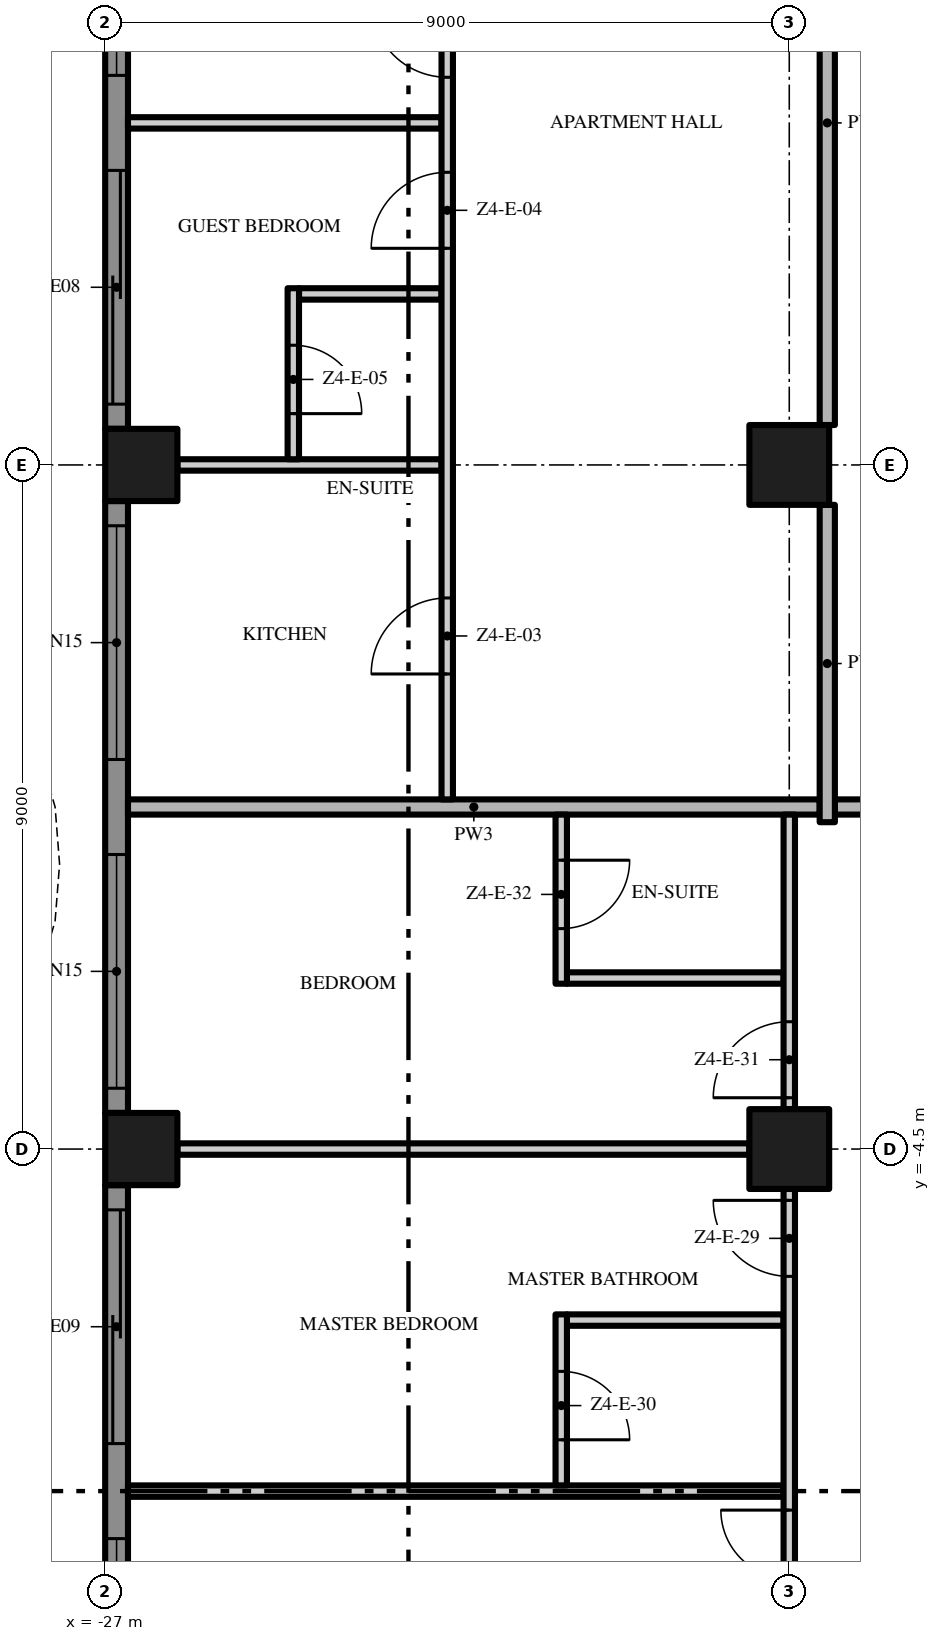
"""IFC4 building model, lengths in metres.
Left out: names, types, materials, properties, quantities, classifications, styles, units other than length and angle.
Written with IfcOpenShell. Run it as: python <this file> out.ifc"""

import sys

from ifc_helpers import new_model, si_unit, direction, frame, frame_2d, origin, origin_2d, place, context, subcontext, project, spatial, polyline, rectangle, outline, extrude, element, fill, save


model = new_model("IFC4")
c1 = context("Model", 3, precision=1e-05, world=origin(), true_north=direction((0.0, 1.0)))
c2 = subcontext(c1, "Body", "Model", "MODEL_VIEW")
j1 = project(units=[si_unit("LENGTHUNIT", "METRE"), si_unit("PLANEANGLEUNIT", "RADIAN")], contexts=[c1])
p1 = place(None, origin())
s1 = spatial("IfcSite", under=j1, at=p1, CompositionType="ELEMENT")
p2 = place(p1, origin())
s2 = spatial("IfcBuilding", under=s1, at=p2, CompositionType="ELEMENT")
p3 = place(p2, frame((0.0, 0.0, 226.2)))
s3 = spatial("IfcBuildingStorey", under=s2, at=p3, CompositionType="ELEMENT", Elevation=226.2)
for number, where, z_axis, x_axis in (
    (1, (-18.0, -4.5, 0.0), (0.0, 0.0, 1.0), (1.0, 0.0, 0.0)),
    (2, (-18.0, 4.5, 0.0), (0.0, 0.0, 1.0), (1.0, 0.0, 0.0)),
):
    element("IfcColumn", number, at=place(p3, frame(where, z_axis=z_axis, x_axis=x_axis)), inside=s3, PredefinedType="COLUMN", context=c2, shape_type="SweptSolid", body=[
        extrude(rectangle(XDim=1.05, YDim=1.05, at=origin_2d()), origin(), (0.0, 0.0, 1.0), 3.5),
    ])
for number, where, z_axis, x_axis in (
    (3, (-26.525, -4.5, 0.0), (0.0, 0.0, 1.0), (1.0, 0.0, 0.0)),
    (4, (-26.525, 4.5, 0.0), (0.0, 0.0, 1.0), (1.0, 0.0, 0.0)),
):
    element("IfcColumn", number, at=place(p3, frame(where, z_axis=z_axis, x_axis=x_axis)), inside=s3, PredefinedType="COLUMN", context=c2, shape_type="SweptSolid", body=[
        extrude(rectangle(XDim=0.95, YDim=0.95, at=origin_2d()), origin(), (0.0, 0.0, 1.0), 3.5),
    ])
p4 = place(p3, frame((-26.85, 4.975, 0.0), z_axis=(0.0, 0.0, 1.0), x_axis=(0.0, 1.0, 0.0)))
e5 = element("IfcWall", 5, at=p4, inside=s3, PredefinedType="SOLIDWALL", context=c2, shape_type="SweptSolid", body=[
    extrude(rectangle(XDim=8.05, YDim=0.3, at=frame_2d((4.025, 0.0))), origin(), (0.0, 0.0, 1.0), 3.5),
])
p5 = place(p4, frame((4.65, 0.0, 0.45)))
e6 = element("IfcOpeningElement", 6, at=p5, cuts=e5, PredefinedType="OPENING", context=c2, shape_type="SweptSolid", body=[
    extrude(rectangle(XDim=3.075, YDim=2.65, at=frame_2d((1.538, 1.325))), frame((0.0, 0.16, 0.0), z_axis=(0.0, -1.0, 0.0), x_axis=(1.0, 0.0, 0.0)), (0.0, 0.0, 1.0), 0.32),
])
p6 = place(p4, frame((0.325, 0.0, 0.0)))
e7 = element("IfcOpeningElement", 7, at=p6, cuts=e5, PredefinedType="OPENING", context=c2, shape_type="SweptSolid", body=[
    extrude(rectangle(XDim=3.075, YDim=2.4, at=frame_2d((1.538, 1.2))), frame((0.0, 0.16, 0.0), z_axis=(0.0, -1.0, 0.0), x_axis=(1.0, 0.0, 0.0)), (0.0, 0.0, 1.0), 0.32),
])
p7 = place(p3, frame((-26.85, -4.025, 0.0), z_axis=(0.0, 0.0, 1.0), x_axis=(0.0, 1.0, 0.0)))
e8 = element("IfcWall", 8, at=p7, inside=s3, PredefinedType="SOLIDWALL", context=c2, shape_type="SweptSolid", body=[
    extrude(rectangle(XDim=8.05, YDim=0.3, at=frame_2d((4.025, 0.0))), origin(), (0.0, 0.0, 1.0), 3.5),
])
p8 = place(p7, frame((4.65, 0.0, 0.45)))
e9 = element("IfcOpeningElement", 9, at=p8, cuts=e8, PredefinedType="OPENING", context=c2, shape_type="SweptSolid", body=[
    extrude(rectangle(XDim=3.075, YDim=2.65, at=frame_2d((1.538, 1.325))), frame((0.0, 0.16, 0.0), z_axis=(0.0, -1.0, 0.0), x_axis=(1.0, 0.0, 0.0)), (0.0, 0.0, 1.0), 0.32),
])
p9 = place(p7, frame((0.325, 0.0, 0.45)))
e10 = element("IfcOpeningElement", 10, at=p9, cuts=e8, PredefinedType="OPENING", context=c2, shape_type="SweptSolid", body=[
    extrude(rectangle(XDim=3.075, YDim=2.65, at=frame_2d((1.538, 1.325))), frame((0.0, 0.16, 0.0), z_axis=(0.0, -1.0, 0.0), x_axis=(1.0, 0.0, 0.0)), (0.0, 0.0, 1.0), 0.32),
])
p10 = place(p3, frame((-26.85, -13.025, 0.0), z_axis=(0.0, 0.0, 1.0), x_axis=(0.0, 1.0, 0.0)))
e11 = element("IfcWall", 11, at=p10, inside=s3, PredefinedType="SOLIDWALL", context=c2, shape_type="SweptSolid", body=[
    extrude(rectangle(XDim=8.05, YDim=0.3, at=frame_2d((4.025, 0.0))), origin(), (0.0, 0.0, 1.0), 3.5),
])
p11 = place(p10, frame((4.65, 0.0, 0.0)))
e12 = element("IfcOpeningElement", 12, at=p11, cuts=e11, PredefinedType="OPENING", context=c2, shape_type="SweptSolid", body=[
    extrude(rectangle(XDim=3.075, YDim=2.4, at=frame_2d((1.538, 1.2))), frame((0.0, 0.16, 0.0), z_axis=(0.0, -1.0, 0.0), x_axis=(1.0, 0.0, 0.0)), (0.0, 0.0, 1.0), 0.32),
])
p12 = place(p10, frame((0.325, 0.0, 0.45)))
e13 = element("IfcOpeningElement", 13, at=p12, cuts=e11, PredefinedType="OPENING", context=c2, shape_type="SweptSolid", body=[
    extrude(rectangle(XDim=3.075, YDim=2.65, at=frame_2d((1.538, 1.325))), frame((0.0, 0.16, 0.0), z_axis=(0.0, -1.0, 0.0), x_axis=(1.0, 0.0, 0.0)), (0.0, 0.0, 1.0), 0.32),
])
p13 = place(p3, origin())
e14 = element("IfcWall", 14, at=p13, inside=s3, PredefinedType="USERDEFINED", context=c2, shape_type="SweptSolid", body=[
    extrude(outline(polyline([(-28.8, 18.0), (-28.095, 16.5), (-27.659, 15.0), (-27.6, 14.25), (-27.659, 13.5), (-28.095, 12.0), (-28.8, 10.5), (-29.505, 9.0), (-29.941, 7.5), (-30.0, 6.75), (-29.941, 6.0), (-29.505, 4.5), (-28.8, 3.0), (-28.095, 1.5), (-27.659, 0.0), (-27.6, -0.75), (-27.659, -1.5), (-28.095, -3.0), (-28.8, -4.5), (-29.505, -6.0), (-29.941, -7.5), (-30.0, -8.25), (-29.941, -9.0), (-29.505, -10.5), (-28.8, -12.0), (-28.095, -13.5), (-27.659, -15.0), (-27.6, -15.75), (-27.659, -16.5), (-28.095, -18.0), (-27.855, -18.07), (-27.411, -16.545), (-27.349, -15.75), (-27.411, -14.955), (-27.86, -13.411), (-28.574, -11.894), (-29.271, -10.411), (-29.694, -8.955), (-29.749, -8.25), (-29.694, -7.545), (-29.271, -6.089), (-28.574, -4.606), (-27.86, -3.089), (-27.411, -1.545), (-27.349, -0.75), (-27.411, 0.045), (-27.86, 1.589), (-28.574, 3.106), (-29.271, 4.589), (-29.694, 6.045), (-29.749, 6.75), (-29.694, 7.455), (-29.271, 8.911), (-28.574, 10.394), (-27.86, 11.911), (-27.411, 13.455), (-27.349, 14.25), (-27.411, 15.045), (-27.86, 16.589), (-28.574, 18.106), (-28.8, 18.0)])), origin(), (0.0, 0.0, 1.0), 0.9),
])
p14 = place(p3, frame((-26.7, -9.0, 0.0), z_axis=(0.0, 0.0, 1.0), x_axis=(1.0, 0.0, 0.0)))
e15 = element("IfcWall", 15, at=p14, inside=s3, PredefinedType="PARTITIONING", context=c2, shape_type="SweptSolid", body=[
    extrude(rectangle(XDim=8.625, YDim=0.15, at=frame_2d((4.312, 0.0))), origin(), (0.0, 0.0, 1.0), 3.5),
])
p15 = place(p3, frame((-20.925, -6.75, 0.0), z_axis=(0.0, 0.0, 1.0), x_axis=(1.0, 0.0, 0.0)))
e16 = element("IfcWall", 16, at=p15, inside=s3, PredefinedType="PARTITIONING", context=c2, shape_type="SweptSolid", body=[
    extrude(rectangle(XDim=2.85, YDim=0.15, at=frame_2d((1.425, 0.0))), origin(), (0.0, 0.0, 1.0), 3.5),
])
p16 = place(p3, frame((-26.05, -4.5, 0.0), z_axis=(0.0, 0.0, 1.0), x_axis=(1.0, 0.0, 0.0)))
e17 = element("IfcWall", 17, at=p16, inside=s3, PredefinedType="PARTITIONING", context=c2, shape_type="SweptSolid", body=[
    extrude(rectangle(XDim=7.525, YDim=0.15, at=frame_2d((3.763, 0.0))), origin(), (0.0, 0.0, 1.0), 3.5),
])
p17 = place(p3, frame((-20.925, -2.25, 0.0), z_axis=(0.0, 0.0, 1.0), x_axis=(1.0, 0.0, 0.0)))
e18 = element("IfcWall", 18, at=p17, inside=s3, PredefinedType="PARTITIONING", context=c2, shape_type="SweptSolid", body=[
    extrude(rectangle(XDim=2.85, YDim=0.15, at=frame_2d((1.425, 0.0))), origin(), (0.0, 0.0, 1.0), 3.5),
])
p18 = place(p3, frame((-17.4, 0.0, 0.0), z_axis=(0.0, 0.0, 1.0), x_axis=(1.0, 0.0, 0.0)))
e19 = element("IfcWall", 19, at=p18, inside=s3, PredefinedType="PARTITIONING", context=c2, shape_type="SweptSolid", body=[
    extrude(rectangle(XDim=12.8, YDim=0.2, at=frame_2d((6.4, 0.0))), origin(), (0.0, 0.0, 1.0), 3.5),
])
p19 = place(p3, frame((-26.7, 0.0, 0.0), z_axis=(0.0, 0.0, 1.0), x_axis=(1.0, 0.0, 0.0)))
e20 = element("IfcWall", 20, at=p19, inside=s3, PredefinedType="PARTITIONING", context=c2, shape_type="SweptSolid", body=[
    extrude(rectangle(XDim=9.1, YDim=0.2, at=frame_2d((4.55, 0.0))), origin(), (0.0, 0.0, 1.0), 3.5),
])
p20 = place(p3, frame((-26.05, 4.5, 0.0), z_axis=(0.0, 0.0, 1.0), x_axis=(1.0, 0.0, 0.0)))
e21 = element("IfcWall", 21, at=p20, inside=s3, PredefinedType="PARTITIONING", context=c2, shape_type="SweptSolid", body=[
    extrude(rectangle(XDim=3.475, YDim=0.15, at=frame_2d((1.738, 0.0))), origin(), (0.0, 0.0, 1.0), 3.5),
])
p21 = place(p3, frame((-24.45, 6.75, 0.0), z_axis=(0.0, 0.0, 1.0), x_axis=(1.0, 0.0, 0.0)))
e22 = element("IfcWall", 22, at=p21, inside=s3, PredefinedType="PARTITIONING", context=c2, shape_type="SweptSolid", body=[
    extrude(rectangle(XDim=1.875, YDim=0.15, at=frame_2d((0.938, 0.0))), origin(), (0.0, 0.0, 1.0), 3.5),
])
p22 = place(p3, frame((-26.7, 9.0, 0.0), z_axis=(0.0, 0.0, 1.0), x_axis=(1.0, 0.0, 0.0)))
e23 = element("IfcWall", 23, at=p22, inside=s3, PredefinedType="PARTITIONING", context=c2, shape_type="SweptSolid", body=[
    extrude(rectangle(XDim=4.125, YDim=0.15, at=frame_2d((2.062, 0.0))), origin(), (0.0, 0.0, 1.0), 3.5),
])
p23 = place(p3, frame((-24.525, 6.825, 0.0), z_axis=(0.0, 0.0, 1.0), x_axis=(0.0, -1.0, 0.0)))
e24 = element("IfcWall", 24, at=p23, inside=s3, PredefinedType="PARTITIONING", context=c2, shape_type="SweptSolid", body=[
    extrude(rectangle(XDim=2.25, YDim=0.15, at=frame_2d((1.125, 0.0))), origin(), (0.0, 0.0, 1.0), 3.5),
])
p24 = place(p23, frame((0.75, 0.0, 0.0)))
e25 = element("IfcOpeningElement", 25, at=p24, cuts=e24, PredefinedType="OPENING", context=c2, shape_type="SweptSolid", body=[
    extrude(rectangle(XDim=0.9, YDim=2.1, at=frame_2d((0.45, 1.05))), frame((0.0, 0.085, 0.0), z_axis=(0.0, -1.0, 0.0), x_axis=(1.0, 0.0, 0.0)), (0.0, 0.0, 1.0), 0.17),
])
p25 = place(p3, frame((-22.5, 0.1, 0.0), z_axis=(0.0, 0.0, 1.0), x_axis=(0.0, 1.0, 0.0)))
e26 = element("IfcWall", 26, at=p25, inside=s3, PredefinedType="PARTITIONING", context=c2, shape_type="SweptSolid", body=[
    extrude(rectangle(XDim=17.425, YDim=0.15, at=frame_2d((8.713, 0.0))), origin(), (0.0, 0.0, 1.0), 3.5),
])
p26 = place(p25, frame((1.65, 0.0, 0.0)))
e27 = element("IfcOpeningElement", 27, at=p26, cuts=e26, PredefinedType="OPENING", context=c2, shape_type="SweptSolid", body=[
    extrude(rectangle(XDim=1.0, YDim=2.4, at=frame_2d((0.5, 1.2))), frame((0.0, 0.085, 0.0), z_axis=(0.0, -1.0, 0.0), x_axis=(1.0, 0.0, 0.0)), (0.0, 0.0, 1.0), 0.17),
])
p27 = place(p25, frame((7.25, 0.0, 0.0)))
e28 = element("IfcOpeningElement", 28, at=p27, cuts=e26, PredefinedType="OPENING", context=c2, shape_type="SweptSolid", body=[
    extrude(rectangle(XDim=1.0, YDim=2.4, at=frame_2d((0.5, 1.2))), frame((0.0, 0.085, 0.0), z_axis=(0.0, -1.0, 0.0), x_axis=(1.0, 0.0, 0.0)), (0.0, 0.0, 1.0), 0.17),
])
p28 = place(p25, frame((9.5, 0.0, 0.0)))
e29 = element("IfcOpeningElement", 29, at=p28, cuts=e26, PredefinedType="OPENING", context=c2, shape_type="SweptSolid", body=[
    extrude(rectangle(XDim=1.0, YDim=2.4, at=frame_2d((0.5, 1.2))), frame((0.0, 0.085, 0.0), z_axis=(0.0, -1.0, 0.0), x_axis=(1.0, 0.0, 0.0)), (0.0, 0.0, 1.0), 0.17),
])
p29 = place(p25, frame((16.275, 0.0, 0.0)))
e30 = element("IfcOpeningElement", 30, at=p29, cuts=e26, PredefinedType="OPENING", context=c2, shape_type="SweptSolid", body=[
    extrude(rectangle(XDim=1.0, YDim=2.4, at=frame_2d((0.5, 1.2))), frame((0.0, 0.085, 0.0), z_axis=(0.0, -1.0, 0.0), x_axis=(1.0, 0.0, 0.0)), (0.0, 0.0, 1.0), 0.17),
])
p30 = place(p3, frame((-21.0, -6.675, 0.0), z_axis=(0.0, 0.0, 1.0), x_axis=(0.0, -1.0, 0.0)))
e31 = element("IfcWall", 31, at=p30, inside=s3, PredefinedType="PARTITIONING", context=c2, shape_type="SweptSolid", body=[
    extrude(rectangle(XDim=2.25, YDim=0.15, at=frame_2d((1.125, 0.0))), origin(), (0.0, 0.0, 1.0), 3.5),
])
p31 = place(p30, frame((0.75, 0.0, 0.0)))
e32 = element("IfcOpeningElement", 32, at=p31, cuts=e31, PredefinedType="OPENING", context=c2, shape_type="SweptSolid", body=[
    extrude(rectangle(XDim=0.9, YDim=2.1, at=frame_2d((0.45, 1.05))), frame((0.0, 0.085, 0.0), z_axis=(0.0, -1.0, 0.0), x_axis=(1.0, 0.0, 0.0)), (0.0, 0.0, 1.0), 0.17),
])
p32 = place(p3, frame((-21.0, -0.1, 0.0), z_axis=(0.0, 0.0, 1.0), x_axis=(0.0, -1.0, 0.0)))
e33 = element("IfcWall", 33, at=p32, inside=s3, PredefinedType="PARTITIONING", context=c2, shape_type="SweptSolid", body=[
    extrude(rectangle(XDim=2.225, YDim=0.15, at=frame_2d((1.113, 0.0))), origin(), (0.0, 0.0, 1.0), 3.5),
])
p33 = place(p32, frame((0.6, 0.0, 0.0)))
e34 = element("IfcOpeningElement", 34, at=p33, cuts=e33, PredefinedType="OPENING", context=c2, shape_type="SweptSolid", body=[
    extrude(rectangle(XDim=0.9, YDim=2.1, at=frame_2d((0.45, 1.05))), frame((0.0, 0.085, 0.0), z_axis=(0.0, -1.0, 0.0), x_axis=(1.0, 0.0, 0.0)), (0.0, 0.0, 1.0), 0.17),
])
p34 = place(p3, frame((-18.0, -12.975, 0.0), z_axis=(0.0, 0.0, 1.0), x_axis=(0.0, 1.0, 0.0)))
e35 = element("IfcWall", 35, at=p34, inside=s3, PredefinedType="PARTITIONING", context=c2, shape_type="SweptSolid", body=[
    extrude(rectangle(XDim=7.95, YDim=0.15, at=frame_2d((3.975, 0.0))), origin(), (0.0, 0.0, 1.0), 3.5),
])
p35 = place(p34, frame((1.925, 0.0, 0.0)))
e36 = element("IfcOpeningElement", 36, at=p35, cuts=e35, PredefinedType="OPENING", context=c2, shape_type="SweptSolid", body=[
    extrude(rectangle(XDim=1.8, YDim=2.4, at=frame_2d((0.9, 1.2))), frame((0.0, 0.085, 0.0), z_axis=(0.0, -1.0, 0.0), x_axis=(1.0, 0.0, 0.0)), (0.0, 0.0, 1.0), 0.17),
])
p36 = place(p34, frame((6.8, 0.0, 0.0)))
e37 = element("IfcOpeningElement", 37, at=p36, cuts=e35, PredefinedType="OPENING", context=c2, shape_type="SweptSolid", body=[
    extrude(rectangle(XDim=1.0, YDim=2.4, at=frame_2d((0.5, 1.2))), frame((0.0, 0.085, 0.0), z_axis=(0.0, -1.0, 0.0), x_axis=(1.0, 0.0, 0.0)), (0.0, 0.0, 1.0), 0.17),
])
p37 = place(p3, frame((-18.0, -3.975, 0.0), z_axis=(0.0, 0.0, 1.0), x_axis=(0.0, 1.0, 0.0)))
e38 = element("IfcWall", 38, at=p37, inside=s3, PredefinedType="PARTITIONING", context=c2, shape_type="SweptSolid", body=[
    extrude(rectangle(XDim=3.875, YDim=0.15, at=frame_2d((1.938, 0.0))), origin(), (0.0, 0.0, 1.0), 3.5),
])
p38 = place(p37, frame((0.15, 0.0, 0.0)))
e39 = element("IfcOpeningElement", 39, at=p38, cuts=e38, PredefinedType="OPENING", context=c2, shape_type="SweptSolid", body=[
    extrude(rectangle(XDim=1.0, YDim=2.4, at=frame_2d((0.5, 1.2))), frame((0.0, 0.085, 0.0), z_axis=(0.0, -1.0, 0.0), x_axis=(1.0, 0.0, 0.0)), (0.0, 0.0, 1.0), 0.17),
])
p39 = place(p3, frame((-17.5, -0.2, 0.0), z_axis=(0.0, 0.0, 1.0), x_axis=(0.0, 1.0, 0.0)))
e40 = element("IfcWall", 40, at=p39, inside=s3, PredefinedType="PARTITIONING", context=c2, shape_type="SweptSolid", body=[
    extrude(rectangle(XDim=4.175, YDim=0.2, at=frame_2d((2.087, 0.0))), origin(), (0.0, 0.0, 1.0), 3.5),
])
p40 = place(p3, frame((-17.5, 5.025, 0.0), z_axis=(0.0, 0.0, 1.0), x_axis=(0.0, 1.0, 0.0)))
e41 = element("IfcWall", 41, at=p40, inside=s3, PredefinedType="PARTITIONING", context=c2, shape_type="SweptSolid", body=[
    extrude(rectangle(XDim=7.95, YDim=0.2, at=frame_2d((3.975, 0.0))), origin(), (0.0, 0.0, 1.0), 3.5),
])
p41 = place(p5, origin())
e42 = element("IfcWindow", 42, at=p41, inside=s3, PartitioningType="SINGLE_PANEL", PredefinedType="WINDOW", context=c2, shape_type="SweptSolid", body=[
    extrude(rectangle(XDim=3.075, YDim=2.65, at=frame_2d((1.538, 1.325))), frame((0.0, 0.03, 0.0), z_axis=(0.0, -1.0, 0.0), x_axis=(1.0, 0.0, 0.0)), (0.0, 0.0, 1.0), 0.06),
])
fill(e6, e42)
p42 = place(p6, origin())
e43 = element("IfcDoor", 43, at=p42, inside=s3, OperationType="SINGLE_SWING_LEFT", PredefinedType="DOOR", context=c2, shape_type="SweptSolid", body=[
    extrude(rectangle(XDim=3.075, YDim=2.4, at=frame_2d((1.538, 1.2))), frame((0.0, 0.025, 0.0), z_axis=(0.0, -1.0, 0.0), x_axis=(1.0, 0.0, 0.0)), (0.0, 0.0, 1.0), 0.05),
])
fill(e7, e43)
p43 = place(p8, origin())
e44 = element("IfcWindow", 44, at=p43, inside=s3, PartitioningType="SINGLE_PANEL", PredefinedType="WINDOW", context=c2, shape_type="SweptSolid", body=[
    extrude(rectangle(XDim=3.075, YDim=2.65, at=frame_2d((1.538, 1.325))), frame((0.0, 0.03, 0.0), z_axis=(0.0, -1.0, 0.0), x_axis=(1.0, 0.0, 0.0)), (0.0, 0.0, 1.0), 0.06),
])
fill(e9, e44)
p44 = place(p9, origin())
e45 = element("IfcWindow", 45, at=p44, inside=s3, PartitioningType="SINGLE_PANEL", PredefinedType="WINDOW", context=c2, shape_type="SweptSolid", body=[
    extrude(rectangle(XDim=3.075, YDim=2.65, at=frame_2d((1.538, 1.325))), frame((0.0, 0.03, 0.0), z_axis=(0.0, -1.0, 0.0), x_axis=(1.0, 0.0, 0.0)), (0.0, 0.0, 1.0), 0.06),
])
fill(e10, e45)
p45 = place(p11, origin())
e46 = element("IfcDoor", 46, at=p45, inside=s3, OperationType="SINGLE_SWING_LEFT", PredefinedType="DOOR", context=c2, shape_type="SweptSolid", body=[
    extrude(rectangle(XDim=3.075, YDim=2.4, at=frame_2d((1.538, 1.2))), frame((0.0, 0.025, 0.0), z_axis=(0.0, -1.0, 0.0), x_axis=(1.0, 0.0, 0.0)), (0.0, 0.0, 1.0), 0.05),
])
fill(e12, e46)
p46 = place(p12, origin())
e47 = element("IfcWindow", 47, at=p46, inside=s3, PartitioningType="SINGLE_PANEL", PredefinedType="WINDOW", context=c2, shape_type="SweptSolid", body=[
    extrude(rectangle(XDim=3.075, YDim=2.65, at=frame_2d((1.538, 1.325))), frame((0.0, 0.03, 0.0), z_axis=(0.0, -1.0, 0.0), x_axis=(1.0, 0.0, 0.0)), (0.0, 0.0, 1.0), 0.06),
])
fill(e13, e47)
p47 = place(p26, origin())
e48 = element("IfcDoor", 48, at=p47, inside=s3, OperationType="SINGLE_SWING_LEFT", PredefinedType="DOOR", context=c2, shape_type="SweptSolid", body=[
    extrude(rectangle(XDim=1.0, YDim=2.4, at=frame_2d((0.5, 1.2))), frame((0.0, 0.025, 0.0), z_axis=(0.0, -1.0, 0.0), x_axis=(1.0, 0.0, 0.0)), (0.0, 0.0, 1.0), 0.05),
])
fill(e27, e48)
p48 = place(p27, origin())
e49 = element("IfcDoor", 49, at=p48, inside=s3, OperationType="SINGLE_SWING_LEFT", PredefinedType="DOOR", context=c2, shape_type="SweptSolid", body=[
    extrude(rectangle(XDim=1.0, YDim=2.4, at=frame_2d((0.5, 1.2))), frame((0.0, 0.025, 0.0), z_axis=(0.0, -1.0, 0.0), x_axis=(1.0, 0.0, 0.0)), (0.0, 0.0, 1.0), 0.05),
])
fill(e28, e49)
p49 = place(p24, origin())
e50 = element("IfcDoor", 50, at=p49, inside=s3, OperationType="SINGLE_SWING_RIGHT", PredefinedType="DOOR", context=c2, shape_type="SweptSolid", body=[
    extrude(rectangle(XDim=0.9, YDim=2.1, at=frame_2d((0.45, 1.05))), frame((0.0, 0.025, 0.0), z_axis=(0.0, -1.0, 0.0), x_axis=(1.0, 0.0, 0.0)), (0.0, 0.0, 1.0), 0.05),
])
fill(e25, e50)
p50 = place(p28, origin())
e51 = element("IfcDoor", 51, at=p50, inside=s3, OperationType="SINGLE_SWING_RIGHT", PredefinedType="DOOR", context=c2, shape_type="SweptSolid", body=[
    extrude(rectangle(XDim=1.0, YDim=2.4, at=frame_2d((0.5, 1.2))), frame((0.0, 0.025, 0.0), z_axis=(0.0, -1.0, 0.0), x_axis=(1.0, 0.0, 0.0)), (0.0, 0.0, 1.0), 0.05),
])
fill(e29, e51)
p51 = place(p35, origin())
e52 = element("IfcDoor", 52, at=p51, inside=s3, OperationType="DOUBLE_DOOR_SINGLE_SWING", PredefinedType="DOOR", context=c2, shape_type="SweptSolid", body=[
    extrude(rectangle(XDim=1.8, YDim=2.4, at=frame_2d((0.9, 1.2))), frame((0.0, 0.025, 0.0), z_axis=(0.0, -1.0, 0.0), x_axis=(1.0, 0.0, 0.0)), (0.0, 0.0, 1.0), 0.05),
])
fill(e36, e52)
p52 = place(p36, origin())
e53 = element("IfcDoor", 53, at=p52, inside=s3, OperationType="SINGLE_SWING_RIGHT", PredefinedType="DOOR", context=c2, shape_type="SweptSolid", body=[
    extrude(rectangle(XDim=1.0, YDim=2.4, at=frame_2d((0.5, 1.2))), frame((0.0, 0.025, 0.0), z_axis=(0.0, -1.0, 0.0), x_axis=(1.0, 0.0, 0.0)), (0.0, 0.0, 1.0), 0.05),
])
fill(e37, e53)
p53 = place(p31, origin())
e54 = element("IfcDoor", 54, at=p53, inside=s3, OperationType="SINGLE_SWING_RIGHT", PredefinedType="DOOR", context=c2, shape_type="SweptSolid", body=[
    extrude(rectangle(XDim=0.9, YDim=2.1, at=frame_2d((0.45, 1.05))), frame((0.0, 0.025, 0.0), z_axis=(0.0, -1.0, 0.0), x_axis=(1.0, 0.0, 0.0)), (0.0, 0.0, 1.0), 0.05),
])
fill(e32, e54)
p54 = place(p38, origin())
e55 = element("IfcDoor", 55, at=p54, inside=s3, OperationType="SINGLE_SWING_LEFT", PredefinedType="DOOR", context=c2, shape_type="SweptSolid", body=[
    extrude(rectangle(XDim=1.0, YDim=2.4, at=frame_2d((0.5, 1.2))), frame((0.0, 0.025, 0.0), z_axis=(0.0, -1.0, 0.0), x_axis=(1.0, 0.0, 0.0)), (0.0, 0.0, 1.0), 0.05),
])
fill(e39, e55)
p55 = place(p33, origin())
e56 = element("IfcDoor", 56, at=p55, inside=s3, OperationType="SINGLE_SWING_LEFT", PredefinedType="DOOR", context=c2, shape_type="SweptSolid", body=[
    extrude(rectangle(XDim=0.9, YDim=2.1, at=frame_2d((0.45, 1.05))), frame((0.0, 0.025, 0.0), z_axis=(0.0, -1.0, 0.0), x_axis=(1.0, 0.0, 0.0)), (0.0, 0.0, 1.0), 0.05),
])
fill(e34, e56)
save(model, sys.argv[1])
